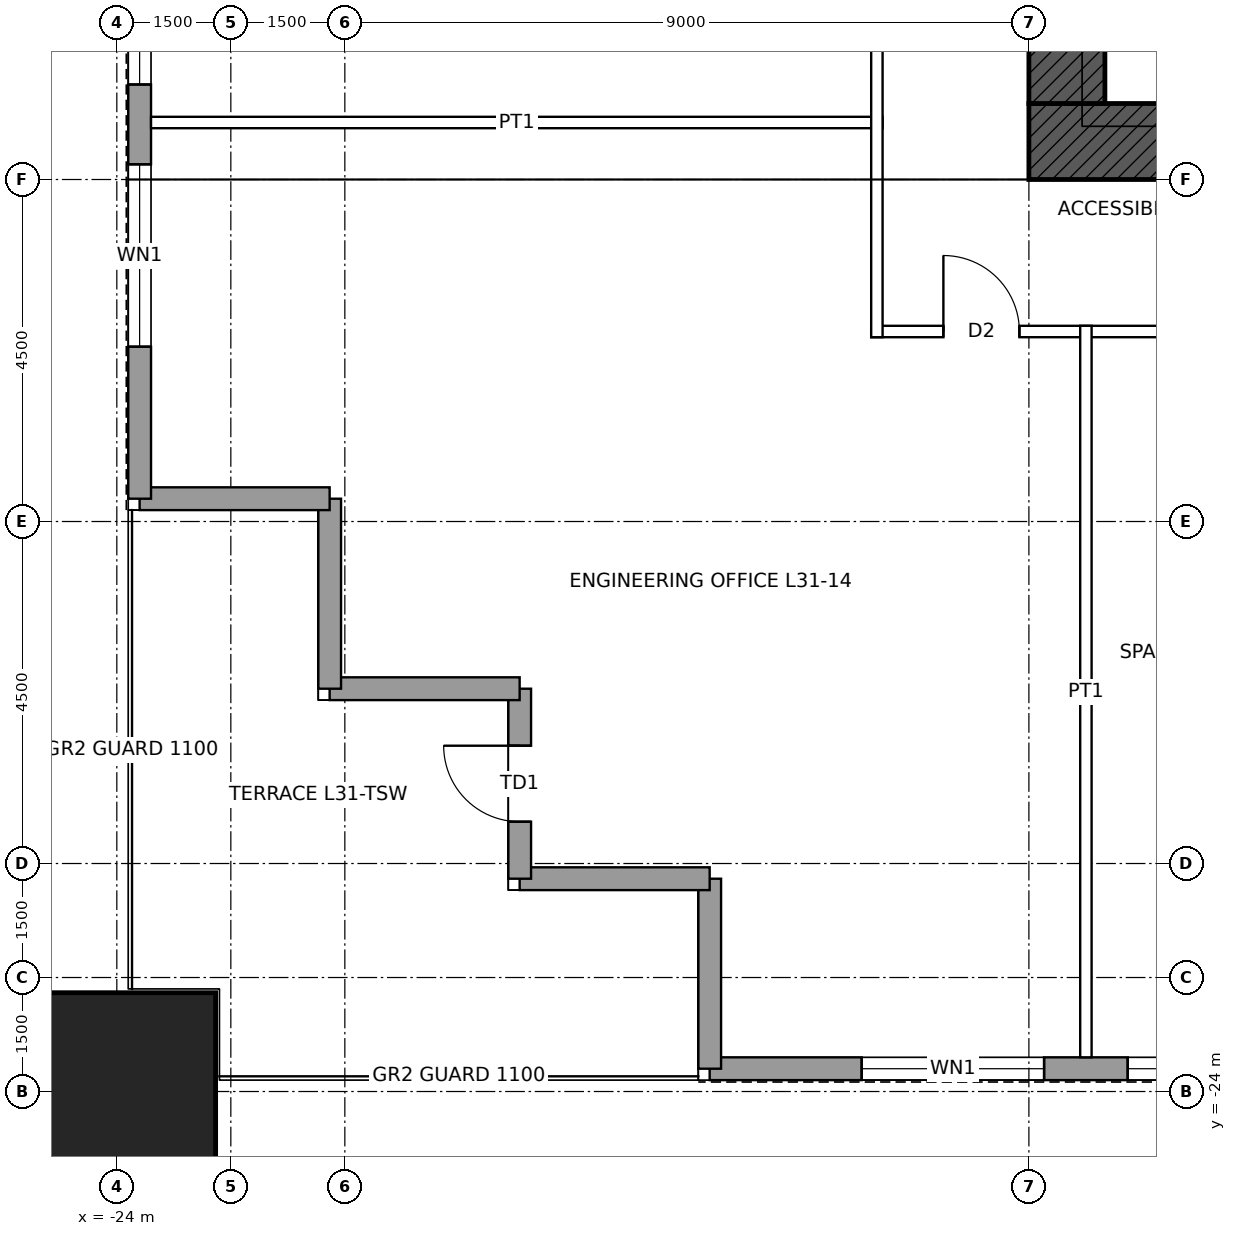
"""IFC4 building model, lengths in metres.
Left out: names, types, materials, properties, quantities, classifications, styles, units other than length and angle.
Written with IfcOpenShell. Run it as: python <this file> out.ifc"""

import sys

from ifc_helpers import new_model, si_unit, direction, frame, frame_2d, origin, origin_2d, place, context, subcontext, project, spatial, rectangle, hollow_rectangle, extrude, element, fill, save


model = new_model("IFC4")
c1 = context("Model", 3, precision=1e-05, world=origin(), true_north=direction((0.0, 1.0)))
c2 = subcontext(c1, "Body", "Model", "MODEL_VIEW")
j1 = project(units=[si_unit("LENGTHUNIT", "METRE"), si_unit("PLANEANGLEUNIT", "RADIAN")], contexts=[c1])
p1 = place(None, origin())
s1 = spatial("IfcSite", under=j1, at=p1, CompositionType="ELEMENT")
p2 = place(p1, origin())
s2 = spatial("IfcBuilding", under=s1, at=p2, CompositionType="ELEMENT")
p3 = place(p2, frame((0.0, 0.0, 153.9)))
s3 = spatial("IfcBuildingStorey", under=s2, at=p3, CompositionType="ELEMENT", Elevation=153.9)
p4 = place(p3, frame((-24.0, -24.0, 0.0), z_axis=(0.0, 0.0, 1.0), x_axis=(1.0, 0.0, 0.0)))
e1 = element("IfcColumn", 1, at=p4, inside=s3, PredefinedType="COLUMN", context=c2, shape_type="SweptSolid", body=[
    extrude(hollow_rectangle(XDim=2.6, YDim=2.6, WallThickness=0.13, at=origin_2d()), origin(), (0.0, 0.0, 1.0), 4.5),
])
p5 = place(p3, frame((12.0, -11.5, 0.0), z_axis=(0.0, 0.0, 1.0), x_axis=(-1.0, 0.0, 0.0)))
e2 = element("IfcWall", 2, at=p5, inside=s3, PredefinedType="SHEAR", context=c2, shape_type="SweptSolid", body=[
    extrude(rectangle(XDim=24.0, YDim=1.0, at=frame_2d((12.0, 0.0))), origin(), (0.0, 0.0, 1.0), 4.5),
])
p6 = place(p5, frame((11.5, 0.0, 0.0)))
e3 = element("IfcOpeningElement", 3, at=p6, cuts=e2, PredefinedType="OPENING", context=c2, shape_type="SweptSolid", body=[
    extrude(rectangle(XDim=1.0, YDim=2.1, at=frame_2d((0.5, 1.05))), frame((0.0, 0.51, 0.0), z_axis=(0.0, -1.0, 0.0), x_axis=(1.0, 0.0, 0.0)), (0.0, 0.0, 1.0), 1.02),
])
p7 = place(p5, frame((1.0, 0.0, 0.0)))
e4 = element("IfcOpeningElement", 4, at=p7, cuts=e2, PredefinedType="OPENING", context=c2, shape_type="SweptSolid", body=[
    extrude(rectangle(XDim=1.0, YDim=2.4, at=frame_2d((0.5, 1.2))), frame((0.0, 0.51, 0.0), z_axis=(0.0, -1.0, 0.0), x_axis=(1.0, 0.0, 0.0)), (0.0, 0.0, 1.0), 1.02),
])
p8 = place(p3, frame((-11.5, -11.0, 0.0), z_axis=(0.0, 0.0, 1.0), x_axis=(0.0, 1.0, 0.0)))
e5 = element("IfcWall", 5, at=p8, inside=s3, PredefinedType="SHEAR", context=c2, shape_type="SweptSolid", body=[
    extrude(rectangle(XDim=22.0, YDim=1.0, at=frame_2d((11.0, 0.0))), origin(), (0.0, 0.0, 1.0), 4.5),
])
p9 = place(p8, frame((10.5, 0.0, 0.0)))
e6 = element("IfcOpeningElement", 6, at=p9, cuts=e5, PredefinedType="OPENING", context=c2, shape_type="SweptSolid", body=[
    extrude(rectangle(XDim=1.0, YDim=2.4, at=frame_2d((0.5, 1.2))), frame((0.0, 0.51, 0.0), z_axis=(0.0, -1.0, 0.0), x_axis=(1.0, 0.0, 0.0)), (0.0, 0.0, 1.0), 1.02),
])
p10 = place(p3, frame((16.2, -23.7, 0.0), z_axis=(0.0, 0.0, 1.0), x_axis=(-1.0, 0.0, 0.0)))
e7 = element("IfcWall", 7, at=p10, inside=s3, PredefinedType="SOLIDWALL", context=c2, shape_type="SweptSolid", body=[
    extrude(rectangle(XDim=32.4, YDim=0.3, at=frame_2d((16.2, 0.0))), origin(), (0.0, 0.0, 1.0), 4.3),
])
p11 = place(p10, frame((2.0, 0.0, 1.0)))
e8 = element("IfcOpeningElement", 8, at=p11, cuts=e7, PredefinedType="OPENING", context=c2, shape_type="SweptSolid", body=[
    extrude(rectangle(XDim=2.4, YDim=1.2, at=frame_2d((1.2, 0.6))), frame((0.0, 0.16, 0.0), z_axis=(0.0, -1.0, 0.0), x_axis=(1.0, 0.0, 0.0)), (0.0, 0.0, 1.0), 0.32),
])
p12 = place(p10, frame((5.5, 0.0, 1.0)))
e9 = element("IfcOpeningElement", 9, at=p12, cuts=e7, PredefinedType="OPENING", context=c2, shape_type="SweptSolid", body=[
    extrude(rectangle(XDim=2.4, YDim=1.2, at=frame_2d((1.2, 0.6))), frame((0.0, 0.16, 0.0), z_axis=(0.0, -1.0, 0.0), x_axis=(1.0, 0.0, 0.0)), (0.0, 0.0, 1.0), 0.32),
])
p13 = place(p10, frame((9.1, 0.0, 1.0)))
e10 = element("IfcOpeningElement", 10, at=p13, cuts=e7, PredefinedType="OPENING", context=c2, shape_type="SweptSolid", body=[
    extrude(rectangle(XDim=2.4, YDim=1.2, at=frame_2d((1.2, 0.6))), frame((0.0, 0.16, 0.0), z_axis=(0.0, -1.0, 0.0), x_axis=(1.0, 0.0, 0.0)), (0.0, 0.0, 1.0), 0.32),
])
p14 = place(p10, frame((11.8, 0.0, 1.0)))
e11 = element("IfcOpeningElement", 11, at=p14, cuts=e7, PredefinedType="OPENING", context=c2, shape_type="SweptSolid", body=[
    extrude(rectangle(XDim=2.4, YDim=1.2, at=frame_2d((1.2, 0.6))), frame((0.0, 0.16, 0.0), z_axis=(0.0, -1.0, 0.0), x_axis=(1.0, 0.0, 0.0)), (0.0, 0.0, 1.0), 0.32),
])
p15 = place(p10, frame((18.2, 0.0, 1.0)))
e12 = element("IfcOpeningElement", 12, at=p15, cuts=e7, PredefinedType="OPENING", context=c2, shape_type="SweptSolid", body=[
    extrude(rectangle(XDim=2.4, YDim=1.2, at=frame_2d((1.2, 0.6))), frame((0.0, 0.16, 0.0), z_axis=(0.0, -1.0, 0.0), x_axis=(1.0, 0.0, 0.0)), (0.0, 0.0, 1.0), 0.32),
])
p16 = place(p10, frame((20.9, 0.0, 1.0)))
e13 = element("IfcOpeningElement", 13, at=p16, cuts=e7, PredefinedType="OPENING", context=c2, shape_type="SweptSolid", body=[
    extrude(rectangle(XDim=2.4, YDim=1.2, at=frame_2d((1.2, 0.6))), frame((0.0, 0.16, 0.0), z_axis=(0.0, -1.0, 0.0), x_axis=(1.0, 0.0, 0.0)), (0.0, 0.0, 1.0), 0.32),
])
p17 = place(p10, frame((24.5, 0.0, 1.0)))
e14 = element("IfcOpeningElement", 14, at=p17, cuts=e7, PredefinedType="OPENING", context=c2, shape_type="SweptSolid", body=[
    extrude(rectangle(XDim=2.4, YDim=1.2, at=frame_2d((1.2, 0.6))), frame((0.0, 0.16, 0.0), z_axis=(0.0, -1.0, 0.0), x_axis=(1.0, 0.0, 0.0)), (0.0, 0.0, 1.0), 0.32),
])
p18 = place(p10, frame((28.0, 0.0, 1.0)))
e15 = element("IfcOpeningElement", 15, at=p18, cuts=e7, PredefinedType="OPENING", context=c2, shape_type="SweptSolid", body=[
    extrude(rectangle(XDim=2.4, YDim=1.2, at=frame_2d((1.2, 0.6))), frame((0.0, 0.16, 0.0), z_axis=(0.0, -1.0, 0.0), x_axis=(1.0, 0.0, 0.0)), (0.0, 0.0, 1.0), 0.32),
])
for number, where, z_axis, x_axis in (
    (16, (-16.2, -23.7, 0.0), (0.0, 0.0, 1.0), (0.0, 1.0, 0.0)),
    (17, (-16.2, -21.2, 0.0), (0.0, 0.0, 1.0), (-1.0, 0.0, 0.0)),
):
    element("IfcWall", number, at=place(p3, frame(where, z_axis=z_axis, x_axis=x_axis)), inside=s3, PredefinedType="SOLIDWALL", context=c2, shape_type="SweptSolid", body=[
        extrude(rectangle(XDim=2.5, YDim=0.3, at=frame_2d((1.25, 0.0))), origin(), (0.0, 0.0, 1.0), 4.3),
    ])
p19 = place(p3, frame((-18.7, -21.2, 0.0), z_axis=(0.0, 0.0, 1.0), x_axis=(0.0, 1.0, 0.0)))
e18 = element("IfcWall", 18, at=p19, inside=s3, PredefinedType="SOLIDWALL", context=c2, shape_type="SweptSolid", body=[
    extrude(rectangle(XDim=2.5, YDim=0.3, at=frame_2d((1.25, 0.0))), origin(), (0.0, 0.0, 1.0), 4.3),
])
p20 = place(p19, frame((0.75, 0.0, 0.0)))
e19 = element("IfcOpeningElement", 19, at=p20, cuts=e18, PredefinedType="OPENING", context=c2, shape_type="SweptSolid", body=[
    extrude(rectangle(XDim=1.0, YDim=2.4, at=frame_2d((0.5, 1.2))), frame((0.0, 0.16, 0.0), z_axis=(0.0, -1.0, 0.0), x_axis=(1.0, 0.0, 0.0)), (0.0, 0.0, 1.0), 0.32),
])
for number, where, z_axis, x_axis in (
    (20, (-18.7, -18.7, 0.0), (0.0, 0.0, 1.0), (-1.0, 0.0, 0.0)),
    (21, (-21.2, -18.7, 0.0), (0.0, 0.0, 1.0), (0.0, 1.0, 0.0)),
    (22, (-21.2, -16.2, 0.0), (0.0, 0.0, 1.0), (-1.0, 0.0, 0.0)),
):
    element("IfcWall", number, at=place(p3, frame(where, z_axis=z_axis, x_axis=x_axis)), inside=s3, PredefinedType="SOLIDWALL", context=c2, shape_type="SweptSolid", body=[
        extrude(rectangle(XDim=2.5, YDim=0.3, at=frame_2d((1.25, 0.0))), origin(), (0.0, 0.0, 1.0), 4.3),
    ])
p21 = place(p3, frame((-23.7, -16.2, 0.0), z_axis=(0.0, 0.0, 1.0), x_axis=(0.0, 1.0, 0.0)))
e23 = element("IfcWall", 23, at=p21, inside=s3, PredefinedType="SOLIDWALL", context=c2, shape_type="SweptSolid", body=[
    extrude(rectangle(XDim=32.4, YDim=0.3, at=frame_2d((16.2, 0.0))), origin(), (0.0, 0.0, 1.0), 4.3),
])
p22 = place(p21, frame((2.0, 0.0, 1.0)))
e24 = element("IfcOpeningElement", 24, at=p22, cuts=e23, PredefinedType="OPENING", context=c2, shape_type="SweptSolid", body=[
    extrude(rectangle(XDim=2.4, YDim=1.2, at=frame_2d((1.2, 0.6))), frame((0.0, 0.16, 0.0), z_axis=(0.0, -1.0, 0.0), x_axis=(1.0, 0.0, 0.0)), (0.0, 0.0, 1.0), 0.32),
])
p23 = place(p21, frame((5.45, 0.0, 1.0)))
e25 = element("IfcOpeningElement", 25, at=p23, cuts=e23, PredefinedType="OPENING", context=c2, shape_type="SweptSolid", body=[
    extrude(rectangle(XDim=2.4, YDim=1.2, at=frame_2d((1.2, 0.6))), frame((0.0, 0.16, 0.0), z_axis=(0.0, -1.0, 0.0), x_axis=(1.0, 0.0, 0.0)), (0.0, 0.0, 1.0), 0.32),
])
p24 = place(p21, frame((8.15, 0.0, 1.0)))
e26 = element("IfcOpeningElement", 26, at=p24, cuts=e23, PredefinedType="OPENING", context=c2, shape_type="SweptSolid", body=[
    extrude(rectangle(XDim=1.8, YDim=1.2, at=frame_2d((0.9, 0.6))), frame((0.0, 0.16, 0.0), z_axis=(0.0, -1.0, 0.0), x_axis=(1.0, 0.0, 0.0)), (0.0, 0.0, 1.0), 0.32),
])
p25 = place(p21, frame((10.25, 0.0, 1.0)))
e27 = element("IfcOpeningElement", 27, at=p25, cuts=e23, PredefinedType="OPENING", context=c2, shape_type="SweptSolid", body=[
    extrude(rectangle(XDim=1.8, YDim=1.2, at=frame_2d((0.9, 0.6))), frame((0.0, 0.16, 0.0), z_axis=(0.0, -1.0, 0.0), x_axis=(1.0, 0.0, 0.0)), (0.0, 0.0, 1.0), 0.32),
])
p26 = place(p21, frame((20.35, 0.0, 1.0)))
e28 = element("IfcOpeningElement", 28, at=p26, cuts=e23, PredefinedType="OPENING", context=c2, shape_type="SweptSolid", body=[
    extrude(rectangle(XDim=1.8, YDim=1.2, at=frame_2d((0.9, 0.6))), frame((0.0, 0.16, 0.0), z_axis=(0.0, -1.0, 0.0), x_axis=(1.0, 0.0, 0.0)), (0.0, 0.0, 1.0), 0.32),
])
p27 = place(p21, frame((22.45, 0.0, 1.0)))
e29 = element("IfcOpeningElement", 29, at=p27, cuts=e23, PredefinedType="OPENING", context=c2, shape_type="SweptSolid", body=[
    extrude(rectangle(XDim=1.8, YDim=1.2, at=frame_2d((0.9, 0.6))), frame((0.0, 0.16, 0.0), z_axis=(0.0, -1.0, 0.0), x_axis=(1.0, 0.0, 0.0)), (0.0, 0.0, 1.0), 0.32),
])
p28 = place(p21, frame((24.55, 0.0, 1.0)))
e30 = element("IfcOpeningElement", 30, at=p28, cuts=e23, PredefinedType="OPENING", context=c2, shape_type="SweptSolid", body=[
    extrude(rectangle(XDim=2.4, YDim=1.2, at=frame_2d((1.2, 0.6))), frame((0.0, 0.16, 0.0), z_axis=(0.0, -1.0, 0.0), x_axis=(1.0, 0.0, 0.0)), (0.0, 0.0, 1.0), 0.32),
])
p29 = place(p21, frame((28.0, 0.0, 1.0)))
e31 = element("IfcOpeningElement", 31, at=p29, cuts=e23, PredefinedType="OPENING", context=c2, shape_type="SweptSolid", body=[
    extrude(rectangle(XDim=2.4, YDim=1.2, at=frame_2d((1.2, 0.6))), frame((0.0, 0.16, 0.0), z_axis=(0.0, -1.0, 0.0), x_axis=(1.0, 0.0, 0.0)), (0.0, 0.0, 1.0), 0.32),
])
p30 = place(p3, frame((-14.075, -14.0, 0.0), z_axis=(0.0, 0.0, 1.0), x_axis=(1.0, 0.0, 0.0)))
e32 = element("IfcWall", 32, at=p30, inside=s3, PredefinedType="PARTITIONING", context=c2, shape_type="SweptSolid", body=[
    extrude(rectangle(XDim=28.15, YDim=0.15, at=frame_2d((14.075, 0.0))), origin(), (0.0, 0.0, 1.0), 4.3),
])
p31 = place(p30, frame((18.8, 0.0, 0.0)))
e33 = element("IfcOpeningElement", 33, at=p31, cuts=e32, PredefinedType="OPENING", context=c2, shape_type="SweptSolid", body=[
    extrude(rectangle(XDim=1.8, YDim=2.4, at=frame_2d((0.9, 1.2))), frame((0.0, 0.085, 0.0), z_axis=(0.0, -1.0, 0.0), x_axis=(1.0, 0.0, 0.0)), (0.0, 0.0, 1.0), 0.17),
])
p32 = place(p30, frame((9.425, 0.0, 0.0)))
e34 = element("IfcOpeningElement", 34, at=p32, cuts=e32, PredefinedType="OPENING", context=c2, shape_type="SweptSolid", body=[
    extrude(rectangle(XDim=1.8, YDim=2.4, at=frame_2d((0.9, 1.2))), frame((0.0, 0.085, 0.0), z_axis=(0.0, -1.0, 0.0), x_axis=(1.0, 0.0, 0.0)), (0.0, 0.0, 1.0), 0.17),
])
p33 = place(p30, frame((4.2, 0.0, 0.0)))
e35 = element("IfcOpeningElement", 35, at=p33, cuts=e32, PredefinedType="OPENING", context=c2, shape_type="SweptSolid", body=[
    extrude(rectangle(XDim=1.0, YDim=2.1, at=frame_2d((0.5, 1.05))), frame((0.0, 0.085, 0.0), z_axis=(0.0, -1.0, 0.0), x_axis=(1.0, 0.0, 0.0)), (0.0, 0.0, 1.0), 0.17),
])
p34 = place(p30, frame((26.2, 0.0, 0.0)))
e36 = element("IfcOpeningElement", 36, at=p34, cuts=e32, PredefinedType="OPENING", context=c2, shape_type="SweptSolid", body=[
    extrude(rectangle(XDim=1.0, YDim=2.1, at=frame_2d((0.5, 1.05))), frame((0.0, 0.085, 0.0), z_axis=(0.0, -1.0, 0.0), x_axis=(1.0, 0.0, 0.0)), (0.0, 0.0, 1.0), 0.17),
])
p35 = place(p30, frame((0.95, 0.0, 0.0)))
e37 = element("IfcOpeningElement", 37, at=p35, cuts=e32, PredefinedType="OPENING", context=c2, shape_type="SweptSolid", body=[
    extrude(rectangle(XDim=1.0, YDim=2.1, at=frame_2d((0.5, 1.05))), frame((0.0, 0.085, 0.0), z_axis=(0.0, -1.0, 0.0), x_axis=(1.0, 0.0, 0.0)), (0.0, 0.0, 1.0), 0.17),
])
p36 = place(p3, frame((-23.55, -11.25, 0.0), z_axis=(0.0, 0.0, 1.0), x_axis=(1.0, 0.0, 0.0)))
e38 = element("IfcWall", 38, at=p36, inside=s3, PredefinedType="PARTITIONING", context=c2, shape_type="SweptSolid", body=[
    extrude(rectangle(XDim=9.625, YDim=0.15, at=frame_2d((4.812, 0.0))), origin(), (0.0, 0.0, 1.0), 3.431),
])
p37 = place(p3, frame((-14.0, -14.075, 0.0), z_axis=(0.0, 0.0, 1.0), x_axis=(0.0, 1.0, 0.0)))
e39 = element("IfcWall", 39, at=p37, inside=s3, PredefinedType="PARTITIONING", context=c2, shape_type="SweptSolid", body=[
    extrude(rectangle(XDim=26.15, YDim=0.15, at=frame_2d((13.075, 0.0))), origin(), (0.0, 0.0, 1.0), 4.3),
])
p38 = place(p37, frame((5.675, 0.0, 0.0)))
e40 = element("IfcOpeningElement", 40, at=p38, cuts=e39, PredefinedType="OPENING", context=c2, shape_type="SweptSolid", body=[
    extrude(rectangle(XDim=1.8, YDim=2.4, at=frame_2d((0.9, 1.2))), frame((0.0, 0.085, 0.0), z_axis=(0.0, -1.0, 0.0), x_axis=(1.0, 0.0, 0.0)), (0.0, 0.0, 1.0), 0.17),
])
p39 = place(p37, frame((13.175, 0.0, 0.0)))
e41 = element("IfcOpeningElement", 41, at=p39, cuts=e39, PredefinedType="OPENING", context=c2, shape_type="SweptSolid", body=[
    extrude(rectangle(XDim=1.8, YDim=2.4, at=frame_2d((0.9, 1.2))), frame((0.0, 0.085, 0.0), z_axis=(0.0, -1.0, 0.0), x_axis=(1.0, 0.0, 0.0)), (0.0, 0.0, 1.0), 0.17),
])
p40 = place(p37, frame((20.675, 0.0, 0.0)))
e42 = element("IfcOpeningElement", 42, at=p40, cuts=e39, PredefinedType="OPENING", context=c2, shape_type="SweptSolid", body=[
    extrude(rectangle(XDim=1.8, YDim=2.4, at=frame_2d((0.9, 1.2))), frame((0.0, 0.085, 0.0), z_axis=(0.0, -1.0, 0.0), x_axis=(1.0, 0.0, 0.0)), (0.0, 0.0, 1.0), 0.17),
])
p41 = place(p3, frame((-11.25, -23.55, 0.0), z_axis=(0.0, 0.0, 1.0), x_axis=(0.0, 1.0, 0.0)))
e43 = element("IfcWall", 43, at=p41, inside=s3, PredefinedType="PARTITIONING", context=c2, shape_type="SweptSolid", body=[
    extrude(rectangle(XDim=9.625, YDim=0.15, at=frame_2d((4.812, 0.0))), origin(), (0.0, 0.0, 1.0), 3.431),
])
p42 = place(p17, origin())
e44 = element("IfcWindow", 44, at=p42, inside=s3, PartitioningType="SINGLE_PANEL", PredefinedType="WINDOW", context=c2, shape_type="SweptSolid", body=[
    extrude(rectangle(XDim=2.4, YDim=1.2, at=frame_2d((1.2, 0.6))), frame((0.0, 0.03, 0.0), z_axis=(0.0, -1.0, 0.0), x_axis=(1.0, 0.0, 0.0)), (0.0, 0.0, 1.0), 0.06),
])
fill(e14, e44)
p43 = place(p18, origin())
e45 = element("IfcWindow", 45, at=p43, inside=s3, PartitioningType="SINGLE_PANEL", PredefinedType="WINDOW", context=c2, shape_type="SweptSolid", body=[
    extrude(rectangle(XDim=2.4, YDim=1.2, at=frame_2d((1.2, 0.6))), frame((0.0, 0.03, 0.0), z_axis=(0.0, -1.0, 0.0), x_axis=(1.0, 0.0, 0.0)), (0.0, 0.0, 1.0), 0.06),
])
fill(e15, e45)
p44 = place(p20, origin())
e46 = element("IfcDoor", 46, at=p44, inside=s3, OperationType="SINGLE_SWING_RIGHT", PredefinedType="DOOR", context=c2, shape_type="SweptSolid", body=[
    extrude(rectangle(XDim=1.0, YDim=2.4, at=frame_2d((0.5, 1.2))), frame((0.0, 0.025, 0.0), z_axis=(0.0, -1.0, 0.0), x_axis=(1.0, 0.0, 0.0)), (0.0, 0.0, 1.0), 0.05),
])
fill(e19, e46)
p45 = place(p22, origin())
e47 = element("IfcWindow", 47, at=p45, inside=s3, PartitioningType="SINGLE_PANEL", PredefinedType="WINDOW", context=c2, shape_type="SweptSolid", body=[
    extrude(rectangle(XDim=2.4, YDim=1.2, at=frame_2d((1.2, 0.6))), frame((0.0, 0.03, 0.0), z_axis=(0.0, -1.0, 0.0), x_axis=(1.0, 0.0, 0.0)), (0.0, 0.0, 1.0), 0.06),
])
fill(e24, e47)
p46 = place(p23, origin())
e48 = element("IfcWindow", 48, at=p46, inside=s3, PartitioningType="SINGLE_PANEL", PredefinedType="WINDOW", context=c2, shape_type="SweptSolid", body=[
    extrude(rectangle(XDim=2.4, YDim=1.2, at=frame_2d((1.2, 0.6))), frame((0.0, 0.03, 0.0), z_axis=(0.0, -1.0, 0.0), x_axis=(1.0, 0.0, 0.0)), (0.0, 0.0, 1.0), 0.06),
])
fill(e25, e48)
p47 = place(p35, origin())
e49 = element("IfcDoor", 49, at=p47, inside=s3, OperationType="SINGLE_SWING_LEFT", PredefinedType="DOOR", context=c2, shape_type="SweptSolid", body=[
    extrude(rectangle(XDim=1.0, YDim=2.1, at=frame_2d((0.5, 1.05))), frame((0.0, 0.025, 0.0), z_axis=(0.0, -1.0, 0.0), x_axis=(1.0, 0.0, 0.0)), (0.0, 0.0, 1.0), 0.05),
])
fill(e37, e49)
save(model, sys.argv[1])
